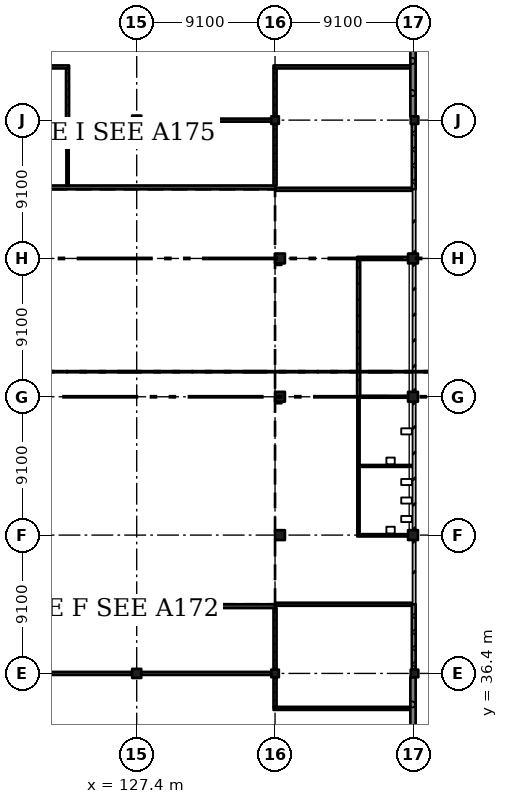
"""IFC4 building model, lengths in metres.
Left out: names, types, materials, properties, quantities, classifications, styles, units other than length and angle.
Written with IfcOpenShell. Run it as: python <this file> out.ifc"""

import sys

from ifc_helpers import new_model, si_unit, direction, frame, frame_2d, origin, origin_2d, place, context, subcontext, project, spatial, rectangle, extrude, element, fill, save


model = new_model("IFC4")
c1 = context("Model", 3, precision=1e-05, world=origin(), true_north=direction((0.0, 1.0)))
c2 = subcontext(c1, "Body", "Model", "MODEL_VIEW")
j1 = project(units=[si_unit("LENGTHUNIT", "METRE"), si_unit("PLANEANGLEUNIT", "RADIAN")], contexts=[c1])
p1 = place(None, origin())
s1 = spatial("IfcSite", under=j1, at=p1, CompositionType="ELEMENT")
p2 = place(p1, origin())
s2 = spatial("IfcBuilding", under=s1, at=p2, CompositionType="ELEMENT")
p3 = place(p2, frame((0.0, 0.0, 24.57)))
s3 = spatial("IfcBuildingStorey", under=s2, at=p3, CompositionType="ELEMENT", Elevation=24.57)
for number, where, z_axis, x_axis in (
    (1, (127.4, 36.4, 0.0), (0.0, 0.0, 1.0), (1.0, 0.0, 0.0)),
    (2, (127.4, 72.8, 0.0), (0.0, 0.0, 1.0), (1.0, 0.0, 0.0)),
):
    element("IfcColumn", number, at=place(p3, frame(where, z_axis=z_axis, x_axis=x_axis)), inside=s3, PredefinedType="COLUMN", context=c2, shape_type="SweptSolid", body=[
        extrude(rectangle(XDim=0.6, YDim=0.6, at=origin_2d()), origin(), (0.0, 0.0, 1.0), 4.55),
    ])
p4 = place(p3, frame((136.5, 36.4, 0.0), z_axis=(0.0, 0.0, 1.0), x_axis=(1.0, 0.0, 0.0)))
e3 = element("IfcColumn", 3, at=p4, inside=s3, PredefinedType="COLUMN", context=c2, shape_type="SweptSolid", body=[
    extrude(rectangle(XDim=0.5, YDim=0.5, at=origin_2d()), origin(), (0.0, 0.0, 1.0), 4.55),
])
for number, where, z_axis, x_axis in (
    (4, (136.825, 45.5, 0.0), (0.0, 0.0, 1.0), (1.0, 0.0, 0.0)),
    (5, (136.825, 54.6, 0.0), (0.0, 0.0, 1.0), (1.0, 0.0, 0.0)),
    (6, (136.825, 63.7, 0.0), (0.0, 0.0, 1.0), (1.0, 0.0, 0.0)),
):
    element("IfcColumn", number, at=place(p3, frame(where, z_axis=z_axis, x_axis=x_axis)), inside=s3, PredefinedType="COLUMN", context=c2, shape_type="SweptSolid", body=[
        extrude(rectangle(XDim=0.65, YDim=0.65, at=origin_2d()), origin(), (0.0, 0.0, 1.0), 4.55),
    ])
for number, where, z_axis, x_axis in (
    (7, (136.5, 72.8, 0.0), (0.0, 0.0, 1.0), (1.0, 0.0, 0.0)),
    (8, (145.675, 36.4, 0.0), (0.0, 0.0, 1.0), (1.0, 0.0, 0.0)),
):
    element("IfcColumn", number, at=place(p3, frame(where, z_axis=z_axis, x_axis=x_axis)), inside=s3, PredefinedType="COLUMN", context=c2, shape_type="SweptSolid", body=[
        extrude(rectangle(XDim=0.5, YDim=0.5, at=origin_2d()), origin(), (0.0, 0.0, 1.0), 4.55),
    ])
for number, where, z_axis, x_axis in (
    (9, (145.575, 45.5, 0.0), (0.0, 0.0, 1.0), (1.0, 0.0, 0.0)),
    (10, (145.575, 54.6, 0.0), (0.0, 0.0, 1.0), (1.0, 0.0, 0.0)),
    (11, (145.575, 63.7, 0.0), (0.0, 0.0, 1.0), (1.0, 0.0, 0.0)),
):
    element("IfcColumn", number, at=place(p3, frame(where, z_axis=z_axis, x_axis=x_axis)), inside=s3, PredefinedType="COLUMN", context=c2, shape_type="SweptSolid", body=[
        extrude(rectangle(XDim=0.65, YDim=0.65, at=origin_2d()), origin(), (0.0, 0.0, 1.0), 4.55),
    ])
p5 = place(p3, frame((145.675, 72.8, 0.0), z_axis=(0.0, 0.0, 1.0), x_axis=(1.0, 0.0, 0.0)))
e12 = element("IfcColumn", 12, at=p5, inside=s3, PredefinedType="COLUMN", context=c2, shape_type="SweptSolid", body=[
    extrude(rectangle(XDim=0.5, YDim=0.5, at=origin_2d()), origin(), (0.0, 0.0, 1.0), 4.55),
])
for number, where, z_axis, x_axis in (
    (13, (104.65, 40.825, 0.0), (0.0, 0.0, 1.0), (1.0, 0.0, 0.0)),
    (14, (104.65, 68.375, 0.0), (0.0, 0.0, 1.0), (1.0, 0.0, 0.0)),
):
    element("IfcWall", number, at=place(p3, frame(where, z_axis=z_axis, x_axis=x_axis)), inside=s3, PredefinedType="SHEAR", context=c2, shape_type="SweptSolid", body=[
        extrude(rectangle(XDim=31.85, YDim=0.25, at=frame_2d((15.925, 0.0))), origin(), (0.0, 0.0, 1.0), 4.55),
    ])
p6 = place(p3, frame((145.575, 27.55, 0.0), z_axis=(0.0, 0.0, 1.0), x_axis=(0.0, 1.0, 0.0)))
e15 = element("IfcWall", 15, at=p6, inside=s3, PredefinedType="SOLIDWALL", context=c2, shape_type="SweptSolid", body=[
    extrude(rectangle(XDim=8.6, YDim=0.35, at=frame_2d((4.3, 0.0))), origin(), (0.0, 0.0, 1.0), 3.6),
])
for number, where, z_axis, x_axis in (
    (16, (145.625, 36.65, 0.0), (0.0, 0.0, 1.0), (0.0, 1.0, 0.0)),
    (17, (145.625, 68.25, 0.0), (0.0, 0.0, 1.0), (0.0, 1.0, 0.0)),
):
    element("IfcWall", number, at=place(p3, frame(where, z_axis=z_axis, x_axis=x_axis)), inside=s3, PredefinedType="SOLIDWALL", context=c2, shape_type="SweptSolid", body=[
        extrude(rectangle(XDim=4.3, YDim=0.25, at=frame_2d((2.15, 0.0))), origin(), (0.0, 0.0, 1.0), 3.6),
    ])
p7 = place(p3, frame((145.575, 73.05, 0.0), z_axis=(0.0, 0.0, 1.0), x_axis=(0.0, 1.0, 0.0)))
e18 = element("IfcWall", 18, at=p7, inside=s3, PredefinedType="SOLIDWALL", context=c2, shape_type="SweptSolid", body=[
    extrude(rectangle(XDim=8.6, YDim=0.35, at=frame_2d((4.3, 0.0))), origin(), (0.0, 0.0, 1.0), 3.6),
])
p8 = place(p3, frame((109.2, 76.3, 0.0), z_axis=(0.0, 0.0, 1.0), x_axis=(1.0, 0.0, 0.0)))
e19 = element("IfcWall", 19, at=p8, inside=s3, PredefinedType="PARTITIONING", context=c2, shape_type="SweptSolid", body=[
    extrude(rectangle(XDim=13.75, YDim=0.2, at=frame_2d((6.875, 0.0))), origin(), (0.0, 0.0, 1.0), 4.35),
])
p9 = place(p8, frame((10.55, 0.0, 0.0)))
e20 = element("IfcOpeningElement", 20, at=p9, cuts=e19, PredefinedType="OPENING", context=c2, shape_type="SweptSolid", body=[
    extrude(rectangle(XDim=1.8, YDim=2.1, at=frame_2d((0.9, 1.05))), frame((0.0, 0.11, 0.0), z_axis=(0.0, -1.0, 0.0), x_axis=(1.0, 0.0, 0.0)), (0.0, 0.0, 1.0), 0.22),
])
p10 = place(p8, frame((4.05, 0.0, 0.0)))
e21 = element("IfcOpeningElement", 21, at=p10, cuts=e19, PredefinedType="OPENING", context=c2, shape_type="SweptSolid", body=[
    extrude(rectangle(XDim=1.0, YDim=2.1, at=frame_2d((0.5, 1.05))), frame((0.0, 0.11, 0.0), z_axis=(0.0, -1.0, 0.0), x_axis=(1.0, 0.0, 0.0)), (0.0, 0.0, 1.0), 0.22),
])
p11 = place(p3, frame((122.85, 68.5, 0.0), z_axis=(0.0, 0.0, 1.0), x_axis=(0.0, 1.0, 0.0)))
e22 = element("IfcWall", 22, at=p11, inside=s3, PredefinedType="PARTITIONING", context=c2, shape_type="SweptSolid", body=[
    extrude(rectangle(XDim=4.3, YDim=0.15, at=frame_2d((2.15, 0.0))), origin(), (0.0, 0.0, 1.0), 4.35),
])
p12 = place(p3, frame((122.85, 76.2, 0.0), z_axis=(0.0, 0.0, 1.0), x_axis=(0.0, -1.0, 0.0)))
e23 = element("IfcWall", 23, at=p12, inside=s3, PredefinedType="PARTITIONING", context=c2, shape_type="SweptSolid", body=[
    extrude(rectangle(XDim=3.4, YDim=0.2, at=frame_2d((1.7, 0.0))), origin(), (0.0, 0.0, 1.0), 3.65),
])
p13 = place(p3, frame((122.95, 72.8, 0.0), z_axis=(0.0, 0.0, 1.0), x_axis=(1.0, 0.0, 0.0)))
e24 = element("IfcWall", 24, at=p13, inside=s3, PredefinedType="PARTITIONING", context=c2, shape_type="SweptSolid", body=[
    extrude(rectangle(XDim=4.15, YDim=0.2, at=frame_2d((2.075, 0.0))), origin(), (0.0, 0.0, 1.0), 3.6),
])
p14 = place(p3, frame((127.1, 36.4, 0.0), z_axis=(0.0, 0.0, 1.0), x_axis=(-1.0, 0.0, 0.0)))
e25 = element("IfcWall", 25, at=p14, inside=s3, PredefinedType="PARTITIONING", context=c2, shape_type="SweptSolid", body=[
    extrude(rectangle(XDim=8.5, YDim=0.2, at=frame_2d((4.25, 0.0))), origin(), (0.0, 0.0, 1.0), 3.6),
])
p15 = place(p3, frame((127.7, 72.8, 0.0), z_axis=(0.0, 0.0, 1.0), x_axis=(1.0, 0.0, 0.0)))
e26 = element("IfcWall", 26, at=p15, inside=s3, PredefinedType="PARTITIONING", context=c2, shape_type="SweptSolid", body=[
    extrude(rectangle(XDim=8.55, YDim=0.2, at=frame_2d((4.275, 0.0))), origin(), (0.0, 0.0, 1.0), 3.6),
])
p16 = place(p15, frame((3.35, 0.0, 0.0)))
e27 = element("IfcOpeningElement", 27, at=p16, cuts=e26, PredefinedType="OPENING", context=c2, shape_type="SweptSolid", body=[
    extrude(rectangle(XDim=1.8, YDim=2.1, at=frame_2d((0.9, 1.05))), frame((0.0, 0.11, 0.0), z_axis=(0.0, -1.0, 0.0), x_axis=(1.0, 0.0, 0.0)), (0.0, 0.0, 1.0), 0.22),
])
p17 = place(p3, frame((136.25, 36.4, 0.0), z_axis=(0.0, 0.0, 1.0), x_axis=(-1.0, 0.0, 0.0)))
e28 = element("IfcWall", 28, at=p17, inside=s3, PredefinedType="PARTITIONING", context=c2, shape_type="SweptSolid", body=[
    extrude(rectangle(XDim=8.55, YDim=0.2, at=frame_2d((4.275, 0.0))), origin(), (0.0, 0.0, 1.0), 3.6),
])
p18 = place(p17, frame((3.35, 0.0, 0.0)))
e29 = element("IfcOpeningElement", 29, at=p18, cuts=e28, PredefinedType="OPENING", context=c2, shape_type="SweptSolid", body=[
    extrude(rectangle(XDim=1.8, YDim=2.1, at=frame_2d((0.9, 1.05))), frame((0.0, 0.11, 0.0), z_axis=(0.0, -1.0, 0.0), x_axis=(1.0, 0.0, 0.0)), (0.0, 0.0, 1.0), 0.22),
])
p19 = place(p3, frame((136.4, 34.1, 0.0), z_axis=(0.0, 0.0, 1.0), x_axis=(1.0, 0.0, 0.0)))
e30 = element("IfcWall", 30, at=p19, inside=s3, PredefinedType="PARTITIONING", context=c2, shape_type="SweptSolid", body=[
    extrude(rectangle(XDim=9.0, YDim=0.2, at=frame_2d((4.5, 0.0))), origin(), (0.0, 0.0, 1.0), 4.35),
])
p20 = place(p19, frame((1.05, 0.0, 0.0)))
e31 = element("IfcOpeningElement", 31, at=p20, cuts=e30, PredefinedType="OPENING", context=c2, shape_type="SweptSolid", body=[
    extrude(rectangle(XDim=2.4, YDim=2.4, at=frame_2d((1.2, 1.2))), frame((0.0, 0.11, 0.0), z_axis=(0.0, -1.0, 0.0), x_axis=(1.0, 0.0, 0.0)), (0.0, 0.0, 1.0), 0.22),
])
p21 = place(p19, frame((5.55, 0.0, 0.0)))
e32 = element("IfcOpeningElement", 32, at=p21, cuts=e30, PredefinedType="OPENING", context=c2, shape_type="SweptSolid", body=[
    extrude(rectangle(XDim=2.4, YDim=2.4, at=frame_2d((1.2, 1.2))), frame((0.0, 0.11, 0.0), z_axis=(0.0, -1.0, 0.0), x_axis=(1.0, 0.0, 0.0)), (0.0, 0.0, 1.0), 0.22),
])
p22 = place(p3, frame((136.5, 36.15, 0.0), z_axis=(0.0, 0.0, 1.0), x_axis=(0.0, -1.0, 0.0)))
e33 = element("IfcWall", 33, at=p22, inside=s3, PredefinedType="PARTITIONING", context=c2, shape_type="SweptSolid", body=[
    extrude(rectangle(XDim=1.95, YDim=0.2, at=frame_2d((0.975, 0.0))), origin(), (0.0, 0.0, 1.0), 3.6),
])
for number, where, z_axis, x_axis in (
    (34, (136.5, 40.7, 0.0), (0.0, 0.0, 1.0), (0.0, -1.0, 0.0)),
    (35, (136.5, 72.55, 0.0), (0.0, 0.0, 1.0), (0.0, -1.0, 0.0)),
):
    element("IfcWall", number, at=place(p3, frame(where, z_axis=z_axis, x_axis=x_axis)), inside=s3, PredefinedType="PARTITIONING", context=c2, shape_type="SweptSolid", body=[
        extrude(rectangle(XDim=4.05, YDim=0.2, at=frame_2d((2.025, 0.0))), origin(), (0.0, 0.0, 1.0), 3.9),
    ])
p23 = place(p3, frame((136.5, 76.2, 0.0), z_axis=(0.0, 0.0, 1.0), x_axis=(0.0, -1.0, 0.0)))
e36 = element("IfcWall", 36, at=p23, inside=s3, PredefinedType="PARTITIONING", context=c2, shape_type="SweptSolid", body=[
    extrude(rectangle(XDim=3.15, YDim=0.2, at=frame_2d((1.575, 0.0))), origin(), (0.0, 0.0, 1.0), 3.6),
])
p24 = place(p23, frame((0.35, 0.0, 0.0)))
e37 = element("IfcOpeningElement", 37, at=p24, cuts=e36, PredefinedType="OPENING", context=c2, shape_type="SweptSolid", body=[
    extrude(rectangle(XDim=2.4, YDim=2.4, at=frame_2d((1.2, 1.2))), frame((0.0, 0.11, 0.0), z_axis=(0.0, -1.0, 0.0), x_axis=(1.0, 0.0, 0.0)), (0.0, 0.0, 1.0), 0.22),
])
p25 = place(p3, frame((136.53, 40.95, 0.0), z_axis=(0.0, 0.0, 1.0), x_axis=(1.0, 0.0, 0.0)))
e38 = element("IfcWall", 38, at=p25, inside=s3, PredefinedType="PARTITIONING", context=c2, shape_type="SweptSolid", body=[
    extrude(rectangle(XDim=8.97, YDim=0.2, at=frame_2d((4.485, 0.0))), origin(), (0.0, 0.0, 1.0), 3.55),
])
p26 = place(p25, frame((1.25, 0.0, 0.0)))
e39 = element("IfcOpeningElement", 39, at=p26, cuts=e38, PredefinedType="OPENING", context=c2, shape_type="SweptSolid", body=[
    extrude(rectangle(XDim=3.0, YDim=2.4, at=frame_2d((1.5, 1.2))), frame((0.0, 0.11, 0.0), z_axis=(0.0, -1.0, 0.0), x_axis=(1.0, 0.0, 0.0)), (0.0, 0.0, 1.0), 0.22),
])
p27 = place(p25, frame((5.72, 0.0, 0.0)))
e40 = element("IfcOpeningElement", 40, at=p27, cuts=e38, PredefinedType="OPENING", context=c2, shape_type="SweptSolid", body=[
    extrude(rectangle(XDim=3.0, YDim=2.4, at=frame_2d((1.5, 1.2))), frame((0.0, 0.11, 0.0), z_axis=(0.0, -1.0, 0.0), x_axis=(1.0, 0.0, 0.0)), (0.0, 0.0, 1.0), 0.22),
])
for number, where, z_axis, x_axis in (
    (41, (136.6, 54.275, 0.0), (0.0, 0.0, 1.0), (1.0, 0.0, 0.0)),
    (42, (136.6, 63.375, 0.0), (0.0, 0.0, 1.0), (1.0, 0.0, 0.0)),
):
    element("IfcWall", number, at=place(p3, frame(where, z_axis=z_axis, x_axis=x_axis)), inside=s3, PredefinedType="PARTITIONING", context=c2, shape_type="SweptSolid", body=[
        extrude(rectangle(XDim=0.325, YDim=0.2, at=frame_2d((0.163, 0.0))), origin(), (0.0, 0.0, 1.0), 8.43),
    ])
p28 = place(p3, frame((141.938, 45.5, 0.0), z_axis=(0.0, 0.0, 1.0), x_axis=(1.0, 0.0, 0.0)))
e43 = element("IfcWall", 43, at=p28, inside=s3, PredefinedType="PARTITIONING", context=c2, shape_type="SweptSolid", body=[
    extrude(rectangle(XDim=3.312, YDim=0.125, at=frame_2d((1.656, 0.0))), origin(), (0.0, 0.0, 1.0), 3.9),
])
p29 = place(p3, frame((142.0, 45.562, 0.0), z_axis=(0.0, 0.0, 1.0), x_axis=(0.0, 1.0, 0.0)))
e44 = element("IfcWall", 44, at=p29, inside=s3, PredefinedType="PARTITIONING", context=c2, shape_type="SweptSolid", body=[
    extrude(rectangle(XDim=9.038, YDim=0.125, at=frame_2d((4.519, 0.0))), origin(), (0.0, 0.0, 1.0), 3.9),
])
p30 = place(p29, frame((1.837, 0.0, 0.0)))
e45 = element("IfcOpeningElement", 45, at=p30, cuts=e44, PredefinedType="OPENING", context=c2, shape_type="SweptSolid", body=[
    extrude(rectangle(XDim=0.9, YDim=2.1, at=frame_2d((0.45, 1.05))), frame((0.0, 0.073, 0.0), z_axis=(0.0, -1.0, 0.0), x_axis=(1.0, 0.0, 0.0)), (0.0, 0.0, 1.0), 0.145),
])
p31 = place(p29, frame((6.288, 0.0, 0.0)))
e46 = element("IfcOpeningElement", 46, at=p31, cuts=e44, PredefinedType="OPENING", context=c2, shape_type="SweptSolid", body=[
    extrude(rectangle(XDim=1.0, YDim=2.1, at=frame_2d((0.5, 1.05))), frame((0.0, 0.073, 0.0), z_axis=(0.0, -1.0, 0.0), x_axis=(1.0, 0.0, 0.0)), (0.0, 0.0, 1.0), 0.145),
])
p32 = place(p3, frame((142.0, 63.6, 0.0), z_axis=(0.0, 0.0, 1.0), x_axis=(0.0, -1.0, 0.0)))
e47 = element("IfcWall", 47, at=p32, inside=s3, PredefinedType="PARTITIONING", context=c2, shape_type="SweptSolid", body=[
    extrude(rectangle(XDim=9.0, YDim=0.2, at=frame_2d((4.5, 0.0))), origin(), (0.0, 0.0, 1.0), 3.9),
])
p33 = place(p32, frame((3.55, 0.0, 0.0)))
e48 = element("IfcOpeningElement", 48, at=p33, cuts=e47, PredefinedType="OPENING", context=c2, shape_type="SweptSolid", body=[
    extrude(rectangle(XDim=1.8, YDim=2.1, at=frame_2d((0.9, 1.05))), frame((0.0, 0.11, 0.0), z_axis=(0.0, -1.0, 0.0), x_axis=(1.0, 0.0, 0.0)), (0.0, 0.0, 1.0), 0.22),
])
p34 = place(p3, frame((136.53, 68.25, 0.0), z_axis=(0.0, 0.0, 1.0), x_axis=(1.0, 0.0, 0.0)))
e49 = element("IfcWall", 49, at=p34, inside=s3, PredefinedType="PARTITIONING", context=c2, shape_type="SweptSolid", body=[
    extrude(rectangle(XDim=8.97, YDim=0.2, at=frame_2d((4.485, 0.0))), origin(), (0.0, 0.0, 1.0), 3.55),
])
p35 = place(p34, frame((1.22, 0.0, 0.0)))
e50 = element("IfcOpeningElement", 50, at=p35, cuts=e49, PredefinedType="OPENING", context=c2, shape_type="SweptSolid", body=[
    extrude(rectangle(XDim=3.0, YDim=2.4, at=frame_2d((1.5, 1.2))), frame((0.0, 0.11, 0.0), z_axis=(0.0, -1.0, 0.0), x_axis=(1.0, 0.0, 0.0)), (0.0, 0.0, 1.0), 0.22),
])
p36 = place(p34, frame((5.72, 0.0, 0.0)))
e51 = element("IfcOpeningElement", 51, at=p36, cuts=e49, PredefinedType="OPENING", context=c2, shape_type="SweptSolid", body=[
    extrude(rectangle(XDim=3.0, YDim=2.4, at=frame_2d((1.5, 1.2))), frame((0.0, 0.11, 0.0), z_axis=(0.0, -1.0, 0.0), x_axis=(1.0, 0.0, 0.0)), (0.0, 0.0, 1.0), 0.22),
])
p37 = place(p3, frame((142.062, 50.05, 0.0), z_axis=(0.0, 0.0, 1.0), x_axis=(1.0, 0.0, 0.0)))
e52 = element("IfcWall", 52, at=p37, inside=s3, PredefinedType="PARTITIONING", context=c2, shape_type="SweptSolid", body=[
    extrude(rectangle(XDim=3.508, YDim=0.125, at=frame_2d((1.754, 0.0))), origin(), (0.0, 0.0, 1.0), 3.9),
])
p38 = place(p3, frame((142.1, 54.6, 0.0), z_axis=(0.0, 0.0, 1.0), x_axis=(1.0, 0.0, 0.0)))
e53 = element("IfcWall", 53, at=p38, inside=s3, PredefinedType="PARTITIONING", context=c2, shape_type="SweptSolid", body=[
    extrude(rectangle(XDim=3.15, YDim=0.125, at=frame_2d((1.575, 0.0))), origin(), (0.0, 0.0, 1.0), 3.9),
])
p39 = place(p3, frame((145.25, 63.7, 0.0), z_axis=(0.0, 0.0, 1.0), x_axis=(-1.0, 0.0, 0.0)))
e54 = element("IfcWall", 54, at=p39, inside=s3, PredefinedType="PARTITIONING", context=c2, shape_type="SweptSolid", body=[
    extrude(rectangle(XDim=3.35, YDim=0.2, at=frame_2d((1.675, 0.0))), origin(), (0.0, 0.0, 1.0), 3.9),
])
p40 = place(p3, frame((145.4, 76.3, 0.0), z_axis=(0.0, 0.0, 1.0), x_axis=(-1.0, 0.0, 0.0)))
e55 = element("IfcWall", 55, at=p40, inside=s3, PredefinedType="PARTITIONING", context=c2, shape_type="SweptSolid", body=[
    extrude(rectangle(XDim=9.0, YDim=0.2, at=frame_2d((4.5, 0.0))), origin(), (0.0, 0.0, 1.0), 4.35),
])
p41 = place(p40, frame((1.05, 0.0, 0.0)))
e56 = element("IfcOpeningElement", 56, at=p41, cuts=e55, PredefinedType="OPENING", context=c2, shape_type="SweptSolid", body=[
    extrude(rectangle(XDim=2.4, YDim=2.4, at=frame_2d((1.2, 1.2))), frame((0.0, 0.11, 0.0), z_axis=(0.0, -1.0, 0.0), x_axis=(1.0, 0.0, 0.0)), (0.0, 0.0, 1.0), 0.22),
])
p42 = place(p40, frame((5.55, 0.0, 0.0)))
e57 = element("IfcOpeningElement", 57, at=p42, cuts=e55, PredefinedType="OPENING", context=c2, shape_type="SweptSolid", body=[
    extrude(rectangle(XDim=2.4, YDim=2.4, at=frame_2d((1.2, 1.2))), frame((0.0, 0.11, 0.0), z_axis=(0.0, -1.0, 0.0), x_axis=(1.0, 0.0, 0.0)), (0.0, 0.0, 1.0), 0.22),
])
p43 = place(p18, origin())
e58 = element("IfcDoor", 58, at=p43, inside=s3, OperationType="DOUBLE_DOOR_SINGLE_SWING", PredefinedType="DOOR", context=c2, shape_type="SweptSolid", body=[
    extrude(rectangle(XDim=1.8, YDim=2.1, at=frame_2d((0.9, 1.05))), frame((0.0, 0.025, 0.0), z_axis=(0.0, -1.0, 0.0), x_axis=(1.0, 0.0, 0.0)), (0.0, 0.0, 1.0), 0.05),
])
fill(e29, e58)
p44 = place(p16, origin())
e59 = element("IfcDoor", 59, at=p44, inside=s3, OperationType="DOUBLE_DOOR_SINGLE_SWING", PredefinedType="DOOR", context=c2, shape_type="SweptSolid", body=[
    extrude(rectangle(XDim=1.8, YDim=2.1, at=frame_2d((0.9, 1.05))), frame((0.0, 0.025, 0.0), z_axis=(0.0, -1.0, 0.0), x_axis=(1.0, 0.0, 0.0)), (0.0, 0.0, 1.0), 0.05),
])
fill(e27, e59)
p45 = place(p30, origin())
e60 = element("IfcDoor", 60, at=p45, inside=s3, OperationType="SINGLE_SWING_RIGHT", PredefinedType="DOOR", context=c2, shape_type="SweptSolid", body=[
    extrude(rectangle(XDim=0.9, YDim=2.1, at=frame_2d((0.45, 1.05))), frame((0.0, 0.025, 0.0), z_axis=(0.0, -1.0, 0.0), x_axis=(1.0, 0.0, 0.0)), (0.0, 0.0, 1.0), 0.05),
])
fill(e45, e60)
p46 = place(p31, origin())
e61 = element("IfcDoor", 61, at=p46, inside=s3, OperationType="SINGLE_SWING_RIGHT", PredefinedType="DOOR", context=c2, shape_type="SweptSolid", body=[
    extrude(rectangle(XDim=1.0, YDim=2.1, at=frame_2d((0.5, 1.05))), frame((0.0, 0.025, 0.0), z_axis=(0.0, -1.0, 0.0), x_axis=(1.0, 0.0, 0.0)), (0.0, 0.0, 1.0), 0.05),
])
fill(e46, e61)
p47 = place(p33, origin())
e62 = element("IfcDoor", 62, at=p47, inside=s3, OperationType="DOUBLE_DOOR_SINGLE_SWING", PredefinedType="DOOR", context=c2, shape_type="SweptSolid", body=[
    extrude(rectangle(XDim=1.8, YDim=2.1, at=frame_2d((0.9, 1.05))), frame((0.0, 0.025, 0.0), z_axis=(0.0, -1.0, 0.0), x_axis=(1.0, 0.0, 0.0)), (0.0, 0.0, 1.0), 0.05),
])
fill(e48, e62)
p48 = place(p20, origin())
e63 = element("IfcDoor", 63, at=p48, inside=s3, OperationType="DOUBLE_DOOR_SINGLE_SWING", PredefinedType="DOOR", context=c2, shape_type="SweptSolid", body=[
    extrude(rectangle(XDim=2.4, YDim=2.4, at=frame_2d((1.2, 1.2))), frame((0.0, 0.025, 0.0), z_axis=(0.0, -1.0, 0.0), x_axis=(1.0, 0.0, 0.0)), (0.0, 0.0, 1.0), 0.05),
])
fill(e31, e63)
p49 = place(p21, origin())
e64 = element("IfcDoor", 64, at=p49, inside=s3, OperationType="DOUBLE_DOOR_SINGLE_SWING", PredefinedType="DOOR", context=c2, shape_type="SweptSolid", body=[
    extrude(rectangle(XDim=2.4, YDim=2.4, at=frame_2d((1.2, 1.2))), frame((0.0, 0.025, 0.0), z_axis=(0.0, -1.0, 0.0), x_axis=(1.0, 0.0, 0.0)), (0.0, 0.0, 1.0), 0.05),
])
fill(e32, e64)
p50 = place(p26, origin())
e65 = element("IfcDoor", 65, at=p50, inside=s3, OperationType="DOUBLE_DOOR_SINGLE_SWING", PredefinedType="DOOR", context=c2, shape_type="SweptSolid", body=[
    extrude(rectangle(XDim=3.0, YDim=2.4, at=frame_2d((1.5, 1.2))), frame((0.0, 0.025, 0.0), z_axis=(0.0, -1.0, 0.0), x_axis=(1.0, 0.0, 0.0)), (0.0, 0.0, 1.0), 0.05),
])
fill(e39, e65)
p51 = place(p27, origin())
e66 = element("IfcDoor", 66, at=p51, inside=s3, OperationType="DOUBLE_DOOR_SINGLE_SWING", PredefinedType="DOOR", context=c2, shape_type="SweptSolid", body=[
    extrude(rectangle(XDim=3.0, YDim=2.4, at=frame_2d((1.5, 1.2))), frame((0.0, 0.025, 0.0), z_axis=(0.0, -1.0, 0.0), x_axis=(1.0, 0.0, 0.0)), (0.0, 0.0, 1.0), 0.05),
])
fill(e40, e66)
p52 = place(p41, origin())
e67 = element("IfcDoor", 67, at=p52, inside=s3, OperationType="DOUBLE_DOOR_SINGLE_SWING", PredefinedType="DOOR", context=c2, shape_type="SweptSolid", body=[
    extrude(rectangle(XDim=2.4, YDim=2.4, at=frame_2d((1.2, 1.2))), frame((0.0, 0.025, 0.0), z_axis=(0.0, -1.0, 0.0), x_axis=(1.0, 0.0, 0.0)), (0.0, 0.0, 1.0), 0.05),
])
fill(e56, e67)
p53 = place(p42, origin())
e68 = element("IfcDoor", 68, at=p53, inside=s3, OperationType="DOUBLE_DOOR_SINGLE_SWING", PredefinedType="DOOR", context=c2, shape_type="SweptSolid", body=[
    extrude(rectangle(XDim=2.4, YDim=2.4, at=frame_2d((1.2, 1.2))), frame((0.0, 0.025, 0.0), z_axis=(0.0, -1.0, 0.0), x_axis=(1.0, 0.0, 0.0)), (0.0, 0.0, 1.0), 0.05),
])
fill(e57, e68)
p54 = place(p24, origin())
e69 = element("IfcDoor", 69, at=p54, inside=s3, OperationType="DOUBLE_DOOR_SINGLE_SWING", PredefinedType="DOOR", context=c2, shape_type="SweptSolid", body=[
    extrude(rectangle(XDim=2.4, YDim=2.4, at=frame_2d((1.2, 1.2))), frame((0.0, 0.025, 0.0), z_axis=(0.0, -1.0, 0.0), x_axis=(1.0, 0.0, 0.0)), (0.0, 0.0, 1.0), 0.05),
])
fill(e37, e69)
p55 = place(p35, origin())
e70 = element("IfcDoor", 70, at=p55, inside=s3, OperationType="DOUBLE_DOOR_SINGLE_SWING", PredefinedType="DOOR", context=c2, shape_type="SweptSolid", body=[
    extrude(rectangle(XDim=3.0, YDim=2.4, at=frame_2d((1.5, 1.2))), frame((0.0, 0.025, 0.0), z_axis=(0.0, -1.0, 0.0), x_axis=(1.0, 0.0, 0.0)), (0.0, 0.0, 1.0), 0.05),
])
fill(e50, e70)
p56 = place(p36, origin())
e71 = element("IfcDoor", 71, at=p56, inside=s3, OperationType="DOUBLE_DOOR_SINGLE_SWING", PredefinedType="DOOR", context=c2, shape_type="SweptSolid", body=[
    extrude(rectangle(XDim=3.0, YDim=2.4, at=frame_2d((1.5, 1.2))), frame((0.0, 0.025, 0.0), z_axis=(0.0, -1.0, 0.0), x_axis=(1.0, 0.0, 0.0)), (0.0, 0.0, 1.0), 0.05),
])
fill(e51, e71)
save(model, sys.argv[1])
